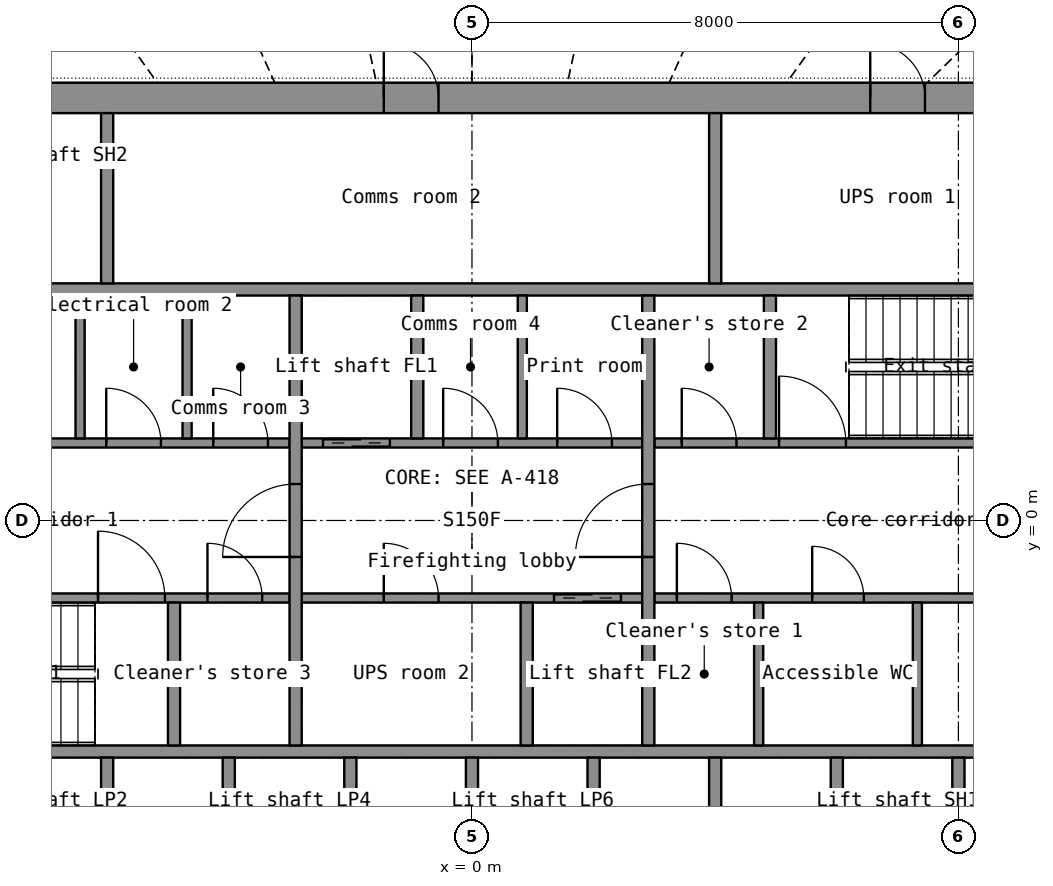
"""IFC4 building model, lengths in metres.
Left out: names, types, materials, properties, quantities, classifications, styles, units other than length and angle.
Written with IfcOpenShell. Run it as: python <this file> out.ifc"""

import sys

from ifc_helpers import new_model, si_unit, direction, frame, frame_2d, origin, place, context, subcontext, project, spatial, rectangle, extrude, element, fill, save


model = new_model("IFC4")
c1 = context("Model", 3, precision=1e-05, world=origin(), true_north=direction((0.0, 1.0)))
c2 = subcontext(c1, "Body", "Model", "MODEL_VIEW")
j1 = project(units=[si_unit("LENGTHUNIT", "METRE"), si_unit("PLANEANGLEUNIT", "RADIAN")], contexts=[c1])
p1 = place(None, origin())
s1 = spatial("IfcSite", under=j1, at=p1, CompositionType="ELEMENT")
p2 = place(p1, origin())
s2 = spatial("IfcBuilding", under=s1, at=p2, CompositionType="ELEMENT")
p3 = place(p2, frame((0.0, 0.0, 134.1)))
s3 = spatial("IfcBuildingStorey", under=s2, at=p3, CompositionType="ELEMENT", Elevation=134.1)
p4 = place(p3, frame((-11.5, 6.95, 0.0), z_axis=(0.0, 0.0, 1.0), x_axis=(1.0, 0.0, 0.0)))
e1 = element("IfcWall", 1, at=p4, inside=s3, PredefinedType="SHEAR", context=c2, shape_type="SweptSolid", body=[
    extrude(rectangle(XDim=23.0, YDim=0.5, at=frame_2d((11.5, 0.0))), origin(), (0.0, 0.0, 1.0), 3.3),
])
p5 = place(p4, frame((1.95, 0.0, 0.0)))
e2 = element("IfcOpeningElement", 2, at=p5, cuts=e1, PredefinedType="OPENING", context=c2, shape_type="SweptSolid", body=[
    extrude(rectangle(XDim=1.1, YDim=2.2, at=frame_2d((0.55, 1.1))), frame((0.0, 0.26, 0.0), z_axis=(0.0, -1.0, 0.0), x_axis=(1.0, 0.0, 0.0)), (0.0, 0.0, 1.0), 0.52),
])
p6 = place(p4, frame((10.05, 0.0, 0.0)))
e3 = element("IfcOpeningElement", 3, at=p6, cuts=e1, PredefinedType="OPENING", context=c2, shape_type="SweptSolid", body=[
    extrude(rectangle(XDim=0.9, YDim=2.1, at=frame_2d((0.45, 1.05))), frame((0.0, 0.26, 0.0), z_axis=(0.0, -1.0, 0.0), x_axis=(1.0, 0.0, 0.0)), (0.0, 0.0, 1.0), 0.52),
])
p7 = place(p4, frame((18.05, 0.0, 0.0)))
e4 = element("IfcOpeningElement", 4, at=p7, cuts=e1, PredefinedType="OPENING", context=c2, shape_type="SweptSolid", body=[
    extrude(rectangle(XDim=0.9, YDim=2.1, at=frame_2d((0.45, 1.05))), frame((0.0, 0.26, 0.0), z_axis=(0.0, -1.0, 0.0), x_axis=(1.0, 0.0, 0.0)), (0.0, 0.0, 1.0), 0.52),
])
p8 = place(p4, frame((0.3, 0.0, 0.0)))
e5 = element("IfcOpeningElement", 5, at=p8, cuts=e1, PredefinedType="OPENING", context=c2, shape_type="SweptSolid", body=[
    extrude(rectangle(XDim=0.8, YDim=2.05, at=frame_2d((0.4, 1.025))), frame((0.0, 0.26, 0.0), z_axis=(0.0, -1.0, 0.0), x_axis=(1.0, 0.0, 0.0)), (0.0, 0.0, 1.0), 0.52),
])
p9 = place(p4, frame((21.9, 0.0, 0.0)))
e6 = element("IfcOpeningElement", 6, at=p9, cuts=e1, PredefinedType="OPENING", context=c2, shape_type="SweptSolid", body=[
    extrude(rectangle(XDim=0.8, YDim=2.05, at=frame_2d((0.4, 1.025))), frame((0.0, 0.26, 0.0), z_axis=(0.0, -1.0, 0.0), x_axis=(1.0, 0.0, 0.0)), (0.0, 0.0, 1.0), 0.52),
])
for number, where, z_axis, x_axis in (
    (7, (-11.5, -3.8, 0.0), (0.0, 0.0, 1.0), (1.0, 0.0, 0.0)),
    (8, (-11.5, 3.8, 0.0), (0.0, 0.0, 1.0), (1.0, 0.0, 0.0)),
):
    element("IfcWall", number, at=place(p3, frame(where, z_axis=z_axis, x_axis=x_axis)), inside=s3, PredefinedType="SHEAR", context=c2, shape_type="SweptSolid", body=[
        extrude(rectangle(XDim=23.0, YDim=0.2, at=frame_2d((11.5, 0.0))), origin(), (0.0, 0.0, 1.0), 3.3),
    ])
for number, where, z_axis, x_axis in (
    (9, (-6.0, -6.7, 0.0), (0.0, 0.0, 1.0), (0.0, 1.0, 0.0)),
    (10, (-4.0, -6.7, 0.0), (0.0, 0.0, 1.0), (0.0, 1.0, 0.0)),
    (11, (-2.0, -6.7, 0.0), (0.0, 0.0, 1.0), (0.0, 1.0, 0.0)),
    (12, (0.0, -6.7, 0.0), (0.0, 0.0, 1.0), (0.0, 1.0, 0.0)),
    (13, (2.0, -6.7, 0.0), (0.0, 0.0, 1.0), (0.0, 1.0, 0.0)),
    (14, (4.0, -6.7, 0.0), (0.0, 0.0, 1.0), (0.0, 1.0, 0.0)),
    (15, (6.0, -6.7, 0.0), (0.0, 0.0, 1.0), (0.0, 1.0, 0.0)),
    (16, (8.0, -6.7, 0.0), (0.0, 0.0, 1.0), (0.0, 1.0, 0.0)),
    (17, (-6.0, 3.9, 0.0), (0.0, 0.0, 1.0), (0.0, 1.0, 0.0)),
):
    element("IfcWall", number, at=place(p3, frame(where, z_axis=z_axis, x_axis=x_axis)), inside=s3, PredefinedType="SHEAR", context=c2, shape_type="SweptSolid", body=[
        extrude(rectangle(XDim=2.8, YDim=0.2, at=frame_2d((1.4, 0.0))), origin(), (0.0, 0.0, 1.0), 3.3),
    ])
p10 = place(p3, frame((4.0, 3.9, 0.0), z_axis=(0.0, 0.0, 1.0), x_axis=(0.0, 1.0, 0.0)))
e18 = element("IfcWall", 18, at=p10, inside=s3, PredefinedType="PARTITIONING", context=c2, shape_type="SweptSolid", body=[
    extrude(rectangle(XDim=2.8, YDim=0.2, at=frame_2d((1.4, 0.0))), origin(), (0.0, 0.0, 1.0), 3.3),
])
p11 = place(p3, frame((-11.5, -1.275, 0.0), z_axis=(0.0, 0.0, 1.0), x_axis=(1.0, 0.0, 0.0)))
e19 = element("IfcWall", 19, at=p11, inside=s3, PredefinedType="SHEAR", context=c2, shape_type="SweptSolid", body=[
    extrude(rectangle(XDim=8.5, YDim=0.15, at=frame_2d((4.25, 0.0))), origin(), (0.0, 0.0, 1.0), 3.3),
])
p12 = place(p11, frame((5.35, 0.0, 0.0)))
e20 = element("IfcOpeningElement", 20, at=p12, cuts=e19, PredefinedType="OPENING", context=c2, shape_type="SweptSolid", body=[
    extrude(rectangle(XDim=1.1, YDim=2.15, at=frame_2d((0.55, 1.075))), frame((0.0, 0.085, 0.0), z_axis=(0.0, -1.0, 0.0), x_axis=(1.0, 0.0, 0.0)), (0.0, 0.0, 1.0), 0.17),
])
p13 = place(p11, frame((7.15, 0.0, 0.0)))
e21 = element("IfcOpeningElement", 21, at=p13, cuts=e19, PredefinedType="OPENING", context=c2, shape_type="SweptSolid", body=[
    extrude(rectangle(XDim=0.9, YDim=2.1, at=frame_2d((0.45, 1.05))), frame((0.0, 0.085, 0.0), z_axis=(0.0, -1.0, 0.0), x_axis=(1.0, 0.0, 0.0)), (0.0, 0.0, 1.0), 0.17),
])
p14 = place(p3, frame((-2.8, -1.275, 0.0), z_axis=(0.0, 0.0, 1.0), x_axis=(1.0, 0.0, 0.0)))
e22 = element("IfcWall", 22, at=p14, inside=s3, PredefinedType="SHEAR", context=c2, shape_type="SweptSolid", body=[
    extrude(rectangle(XDim=5.6, YDim=0.15, at=frame_2d((2.8, 0.0))), origin(), (0.0, 0.0, 1.0), 3.3),
])
p15 = place(p14, frame((4.15, 0.0, 0.0)))
e23 = element("IfcOpeningElement", 23, at=p15, cuts=e22, PredefinedType="OPENING", context=c2, shape_type="SweptSolid", body=[
    extrude(rectangle(XDim=1.1, YDim=2.2, at=frame_2d((0.55, 1.1))), frame((0.0, 0.085, 0.0), z_axis=(0.0, -1.0, 0.0), x_axis=(1.0, 0.0, 0.0)), (0.0, 0.0, 1.0), 0.17),
])
p16 = place(p14, frame((1.35, 0.0, 0.0)))
e24 = element("IfcOpeningElement", 24, at=p16, cuts=e22, PredefinedType="OPENING", context=c2, shape_type="SweptSolid", body=[
    extrude(rectangle(XDim=0.9, YDim=2.1, at=frame_2d((0.45, 1.05))), frame((0.0, 0.085, 0.0), z_axis=(0.0, -1.0, 0.0), x_axis=(1.0, 0.0, 0.0)), (0.0, 0.0, 1.0), 0.17),
])
p17 = place(p3, frame((3.0, -1.275, 0.0), z_axis=(0.0, 0.0, 1.0), x_axis=(1.0, 0.0, 0.0)))
e25 = element("IfcWall", 25, at=p17, inside=s3, PredefinedType="PARTITIONING", context=c2, shape_type="SweptSolid", body=[
    extrude(rectangle(XDim=8.5, YDim=0.15, at=frame_2d((4.25, 0.0))), origin(), (0.0, 0.0, 1.0), 3.3),
])
p18 = place(p17, frame((0.37, 0.0, 0.0)))
e26 = element("IfcOpeningElement", 26, at=p18, cuts=e25, PredefinedType="OPENING", context=c2, shape_type="SweptSolid", body=[
    extrude(rectangle(XDim=0.9, YDim=2.1, at=frame_2d((0.45, 1.05))), frame((0.0, 0.085, 0.0), z_axis=(0.0, -1.0, 0.0), x_axis=(1.0, 0.0, 0.0)), (0.0, 0.0, 1.0), 0.17),
])
p19 = place(p17, frame((2.595, 0.0, 0.0)))
e27 = element("IfcOpeningElement", 27, at=p19, cuts=e25, PredefinedType="OPENING", context=c2, shape_type="SweptSolid", body=[
    extrude(rectangle(XDim=0.85, YDim=2.1, at=frame_2d((0.425, 1.05))), frame((0.0, 0.085, 0.0), z_axis=(0.0, -1.0, 0.0), x_axis=(1.0, 0.0, 0.0)), (0.0, 0.0, 1.0), 0.17),
])
p20 = place(p17, frame((6.025, 0.0, 0.0)))
e28 = element("IfcOpeningElement", 28, at=p20, cuts=e25, PredefinedType="OPENING", context=c2, shape_type="SweptSolid", body=[
    extrude(rectangle(XDim=0.85, YDim=2.1, at=frame_2d((0.425, 1.05))), frame((0.0, 0.085, 0.0), z_axis=(0.0, -1.0, 0.0), x_axis=(1.0, 0.0, 0.0)), (0.0, 0.0, 1.0), 0.17),
])
p21 = place(p3, frame((-11.5, 1.275, 0.0), z_axis=(0.0, 0.0, 1.0), x_axis=(1.0, 0.0, 0.0)))
e29 = element("IfcWall", 29, at=p21, inside=s3, PredefinedType="PARTITIONING", context=c2, shape_type="SweptSolid", body=[
    extrude(rectangle(XDim=8.5, YDim=0.15, at=frame_2d((4.25, 0.0))), origin(), (0.0, 0.0, 1.0), 3.3),
])
p22 = place(p21, frame((0.782, 0.0, 0.0)))
e30 = element("IfcOpeningElement", 30, at=p22, cuts=e29, PredefinedType="OPENING", context=c2, shape_type="SweptSolid", body=[
    extrude(rectangle(XDim=0.85, YDim=2.1, at=frame_2d((0.425, 1.05))), frame((0.0, 0.085, 0.0), z_axis=(0.0, -1.0, 0.0), x_axis=(1.0, 0.0, 0.0)), (0.0, 0.0, 1.0), 0.17),
])
p23 = place(p21, frame((3.347, 0.0, 0.0)))
e31 = element("IfcOpeningElement", 31, at=p23, cuts=e29, PredefinedType="OPENING", context=c2, shape_type="SweptSolid", body=[
    extrude(rectangle(XDim=0.85, YDim=2.1, at=frame_2d((0.425, 1.05))), frame((0.0, 0.085, 0.0), z_axis=(0.0, -1.0, 0.0), x_axis=(1.0, 0.0, 0.0)), (0.0, 0.0, 1.0), 0.17),
])
p24 = place(p21, frame((5.485, 0.0, 0.0)))
e32 = element("IfcOpeningElement", 32, at=p24, cuts=e29, PredefinedType="OPENING", context=c2, shape_type="SweptSolid", body=[
    extrude(rectangle(XDim=0.9, YDim=2.1, at=frame_2d((0.45, 1.05))), frame((0.0, 0.085, 0.0), z_axis=(0.0, -1.0, 0.0), x_axis=(1.0, 0.0, 0.0)), (0.0, 0.0, 1.0), 0.17),
])
p25 = place(p21, frame((7.245, 0.0, 0.0)))
e33 = element("IfcOpeningElement", 33, at=p25, cuts=e29, PredefinedType="OPENING", context=c2, shape_type="SweptSolid", body=[
    extrude(rectangle(XDim=0.9, YDim=2.1, at=frame_2d((0.45, 1.05))), frame((0.0, 0.085, 0.0), z_axis=(0.0, -1.0, 0.0), x_axis=(1.0, 0.0, 0.0)), (0.0, 0.0, 1.0), 0.17),
])
p26 = place(p3, frame((-2.8, 1.275, 0.0), z_axis=(0.0, 0.0, 1.0), x_axis=(1.0, 0.0, 0.0)))
e34 = element("IfcWall", 34, at=p26, inside=s3, PredefinedType="SHEAR", context=c2, shape_type="SweptSolid", body=[
    extrude(rectangle(XDim=5.6, YDim=0.15, at=frame_2d((2.8, 0.0))), origin(), (0.0, 0.0, 1.0), 3.3),
])
p27 = place(p26, frame((0.35, 0.0, 0.0)))
e35 = element("IfcOpeningElement", 35, at=p27, cuts=e34, PredefinedType="OPENING", context=c2, shape_type="SweptSolid", body=[
    extrude(rectangle(XDim=1.1, YDim=2.2, at=frame_2d((0.55, 1.1))), frame((0.0, 0.085, 0.0), z_axis=(0.0, -1.0, 0.0), x_axis=(1.0, 0.0, 0.0)), (0.0, 0.0, 1.0), 0.17),
])
p28 = place(p26, frame((2.326, 0.0, 0.0)))
e36 = element("IfcOpeningElement", 36, at=p28, cuts=e34, PredefinedType="OPENING", context=c2, shape_type="SweptSolid", body=[
    extrude(rectangle(XDim=0.9, YDim=2.1, at=frame_2d((0.45, 1.05))), frame((0.0, 0.085, 0.0), z_axis=(0.0, -1.0, 0.0), x_axis=(1.0, 0.0, 0.0)), (0.0, 0.0, 1.0), 0.17),
])
p29 = place(p26, frame((4.201, 0.0, 0.0)))
e37 = element("IfcOpeningElement", 37, at=p29, cuts=e34, PredefinedType="OPENING", context=c2, shape_type="SweptSolid", body=[
    extrude(rectangle(XDim=0.9, YDim=2.1, at=frame_2d((0.45, 1.05))), frame((0.0, 0.085, 0.0), z_axis=(0.0, -1.0, 0.0), x_axis=(1.0, 0.0, 0.0)), (0.0, 0.0, 1.0), 0.17),
])
p30 = place(p3, frame((3.0, 1.275, 0.0), z_axis=(0.0, 0.0, 1.0), x_axis=(1.0, 0.0, 0.0)))
e38 = element("IfcWall", 38, at=p30, inside=s3, PredefinedType="SHEAR", context=c2, shape_type="SweptSolid", body=[
    extrude(rectangle(XDim=8.5, YDim=0.15, at=frame_2d((4.25, 0.0))), origin(), (0.0, 0.0, 1.0), 3.3),
])
p31 = place(p30, frame((2.05, 0.0, 0.0)))
e39 = element("IfcOpeningElement", 39, at=p31, cuts=e38, PredefinedType="OPENING", context=c2, shape_type="SweptSolid", body=[
    extrude(rectangle(XDim=1.1, YDim=2.15, at=frame_2d((0.55, 1.075))), frame((0.0, 0.085, 0.0), z_axis=(0.0, -1.0, 0.0), x_axis=(1.0, 0.0, 0.0)), (0.0, 0.0, 1.0), 0.17),
])
p32 = place(p30, frame((0.45, 0.0, 0.0)))
e40 = element("IfcOpeningElement", 40, at=p32, cuts=e38, PredefinedType="OPENING", context=c2, shape_type="SweptSolid", body=[
    extrude(rectangle(XDim=0.9, YDim=2.1, at=frame_2d((0.45, 1.05))), frame((0.0, 0.085, 0.0), z_axis=(0.0, -1.0, 0.0), x_axis=(1.0, 0.0, 0.0)), (0.0, 0.0, 1.0), 0.17),
])
p33 = place(p3, frame((-2.9, -3.7, 0.0), z_axis=(0.0, 0.0, 1.0), x_axis=(0.0, 1.0, 0.0)))
e41 = element("IfcWall", 41, at=p33, inside=s3, PredefinedType="SHEAR", context=c2, shape_type="SweptSolid", body=[
    extrude(rectangle(XDim=7.4, YDim=0.2, at=frame_2d((3.7, 0.0))), origin(), (0.0, 0.0, 1.0), 3.3),
])
p34 = place(p33, frame((3.1, 0.0, 0.0)))
e42 = element("IfcOpeningElement", 42, at=p34, cuts=e41, PredefinedType="OPENING", context=c2, shape_type="SweptSolid", body=[
    extrude(rectangle(XDim=1.2, YDim=2.2, at=frame_2d((0.6, 1.1))), frame((0.0, 0.11, 0.0), z_axis=(0.0, -1.0, 0.0), x_axis=(1.0, 0.0, 0.0)), (0.0, 0.0, 1.0), 0.22),
])
p35 = place(p3, frame((2.9, -3.7, 0.0), z_axis=(0.0, 0.0, 1.0), x_axis=(0.0, 1.0, 0.0)))
e43 = element("IfcWall", 43, at=p35, inside=s3, PredefinedType="SHEAR", context=c2, shape_type="SweptSolid", body=[
    extrude(rectangle(XDim=7.4, YDim=0.2, at=frame_2d((3.7, 0.0))), origin(), (0.0, 0.0, 1.0), 3.3),
])
p36 = place(p35, frame((3.1, 0.0, 0.0)))
e44 = element("IfcOpeningElement", 44, at=p36, cuts=e43, PredefinedType="OPENING", context=c2, shape_type="SweptSolid", body=[
    extrude(rectangle(XDim=1.2, YDim=2.2, at=frame_2d((0.6, 1.1))), frame((0.0, 0.11, 0.0), z_axis=(0.0, -1.0, 0.0), x_axis=(1.0, 0.0, 0.0)), (0.0, 0.0, 1.0), 0.22),
])
for number, where, z_axis, x_axis in (
    (45, (-0.9, 1.35, 0.0), (0.0, 0.0, 1.0), (0.0, 1.0, 0.0)),
    (46, (0.9, -3.7, 0.0), (0.0, 0.0, 1.0), (0.0, 1.0, 0.0)),
    (47, (-4.9, -3.7, 0.0), (0.0, 0.0, 1.0), (0.0, 1.0, 0.0)),
    (48, (4.9, 1.35, 0.0), (0.0, 0.0, 1.0), (0.0, 1.0, 0.0)),
):
    element("IfcWall", number, at=place(p3, frame(where, z_axis=z_axis, x_axis=x_axis)), inside=s3, PredefinedType="SHEAR", context=c2, shape_type="SweptSolid", body=[
        extrude(rectangle(XDim=2.35, YDim=0.2, at=frame_2d((1.175, 0.0))), origin(), (0.0, 0.0, 1.0), 3.3),
    ])
for number, where, z_axis, x_axis in (
    (49, (-6.445, 1.35, 0.0), (0.0, 0.0, 1.0), (0.0, 1.0, 0.0)),
    (50, (-4.685, 1.35, 0.0), (0.0, 0.0, 1.0), (0.0, 1.0, 0.0)),
    (51, (4.715, -3.7, 0.0), (0.0, 0.0, 1.0), (0.0, 1.0, 0.0)),
    (52, (7.325, -3.7, 0.0), (0.0, 0.0, 1.0), (0.0, 1.0, 0.0)),
    (53, (0.827, 1.35, 0.0), (0.0, 0.0, 1.0), (0.0, 1.0, 0.0)),
):
    element("IfcWall", number, at=place(p3, frame(where, z_axis=z_axis, x_axis=x_axis)), inside=s3, PredefinedType="PARTITIONING", context=c2, shape_type="SweptSolid", body=[
        extrude(rectangle(XDim=2.35, YDim=0.15, at=frame_2d((1.175, 0.0))), origin(), (0.0, 0.0, 1.0), 3.3),
    ])
p37 = place(p6, origin())
e54 = element("IfcDoor", 54, at=p37, inside=s3, OperationType="SINGLE_SWING_LEFT", PredefinedType="DOOR", context=c2, shape_type="SweptSolid", body=[
    extrude(rectangle(XDim=0.9, YDim=2.1, at=frame_2d((0.45, 1.05))), frame((0.0, 0.025, 0.0), z_axis=(0.0, -1.0, 0.0), x_axis=(1.0, 0.0, 0.0)), (0.0, 0.0, 1.0), 0.05),
])
fill(e3, e54)
p38 = place(p7, origin())
e55 = element("IfcDoor", 55, at=p38, inside=s3, OperationType="SINGLE_SWING_LEFT", PredefinedType="DOOR", context=c2, shape_type="SweptSolid", body=[
    extrude(rectangle(XDim=0.9, YDim=2.1, at=frame_2d((0.45, 1.05))), frame((0.0, 0.025, 0.0), z_axis=(0.0, -1.0, 0.0), x_axis=(1.0, 0.0, 0.0)), (0.0, 0.0, 1.0), 0.05),
])
fill(e4, e55)
p39 = place(p34, origin())
e56 = element("IfcDoor", 56, at=p39, inside=s3, OperationType="SINGLE_SWING_LEFT", PredefinedType="DOOR", context=c2, shape_type="SweptSolid", body=[
    extrude(rectangle(XDim=1.2, YDim=2.2, at=frame_2d((0.6, 1.1))), frame((0.0, 0.025, 0.0), z_axis=(0.0, -1.0, 0.0), x_axis=(1.0, 0.0, 0.0)), (0.0, 0.0, 1.0), 0.05),
])
fill(e42, e56)
p40 = place(p36, origin())
e57 = element("IfcDoor", 57, at=p40, inside=s3, OperationType="SINGLE_SWING_LEFT", PredefinedType="DOOR", context=c2, shape_type="SweptSolid", body=[
    extrude(rectangle(XDim=1.2, YDim=2.2, at=frame_2d((0.6, 1.1))), frame((0.0, 0.025, 0.0), z_axis=(0.0, -1.0, 0.0), x_axis=(1.0, 0.0, 0.0)), (0.0, 0.0, 1.0), 0.05),
])
fill(e44, e57)
p41 = place(p27, origin())
e58 = element("IfcDoor", 58, at=p41, inside=s3, OperationType="DOUBLE_DOOR_SLIDING", PredefinedType="DOOR", context=c2, shape_type="SweptSolid", body=[
    extrude(rectangle(XDim=1.1, YDim=2.2, at=frame_2d((0.55, 1.1))), frame((0.0, 0.025, 0.0), z_axis=(0.0, -1.0, 0.0), x_axis=(1.0, 0.0, 0.0)), (0.0, 0.0, 1.0), 0.05),
])
fill(e35, e58)
p42 = place(p15, origin())
e59 = element("IfcDoor", 59, at=p42, inside=s3, OperationType="DOUBLE_DOOR_SLIDING", PredefinedType="DOOR", context=c2, shape_type="SweptSolid", body=[
    extrude(rectangle(XDim=1.1, YDim=2.2, at=frame_2d((0.55, 1.1))), frame((0.0, 0.025, 0.0), z_axis=(0.0, -1.0, 0.0), x_axis=(1.0, 0.0, 0.0)), (0.0, 0.0, 1.0), 0.05),
])
fill(e23, e59)
p43 = place(p12, origin())
e60 = element("IfcDoor", 60, at=p43, inside=s3, OperationType="SINGLE_SWING_LEFT", PredefinedType="DOOR", context=c2, shape_type="SweptSolid", body=[
    extrude(rectangle(XDim=1.1, YDim=2.15, at=frame_2d((0.55, 1.075))), frame((0.0, 0.025, 0.0), z_axis=(0.0, -1.0, 0.0), x_axis=(1.0, 0.0, 0.0)), (0.0, 0.0, 1.0), 0.05),
])
fill(e20, e60)
p44 = place(p31, origin())
e61 = element("IfcDoor", 61, at=p44, inside=s3, OperationType="SINGLE_SWING_LEFT", PredefinedType="DOOR", context=c2, shape_type="SweptSolid", body=[
    extrude(rectangle(XDim=1.1, YDim=2.15, at=frame_2d((0.55, 1.075))), frame((0.0, 0.025, 0.0), z_axis=(0.0, -1.0, 0.0), x_axis=(1.0, 0.0, 0.0)), (0.0, 0.0, 1.0), 0.05),
])
fill(e39, e61)
p45 = place(p24, origin())
e62 = element("IfcDoor", 62, at=p45, inside=s3, OperationType="SINGLE_SWING_LEFT", PredefinedType="DOOR", context=c2, shape_type="SweptSolid", body=[
    extrude(rectangle(XDim=0.9, YDim=2.1, at=frame_2d((0.45, 1.05))), frame((0.0, 0.025, 0.0), z_axis=(0.0, -1.0, 0.0), x_axis=(1.0, 0.0, 0.0)), (0.0, 0.0, 1.0), 0.05),
])
fill(e32, e62)
p46 = place(p25, origin())
e63 = element("IfcDoor", 63, at=p46, inside=s3, OperationType="SINGLE_SWING_LEFT", PredefinedType="DOOR", context=c2, shape_type="SweptSolid", body=[
    extrude(rectangle(XDim=0.9, YDim=2.1, at=frame_2d((0.45, 1.05))), frame((0.0, 0.025, 0.0), z_axis=(0.0, -1.0, 0.0), x_axis=(1.0, 0.0, 0.0)), (0.0, 0.0, 1.0), 0.05),
])
fill(e33, e63)
p47 = place(p18, origin())
e64 = element("IfcDoor", 64, at=p47, inside=s3, OperationType="SINGLE_SWING_LEFT", PredefinedType="DOOR", context=c2, shape_type="SweptSolid", body=[
    extrude(rectangle(XDim=0.9, YDim=2.1, at=frame_2d((0.45, 1.05))), frame((0.0, 0.025, 0.0), z_axis=(0.0, -1.0, 0.0), x_axis=(1.0, 0.0, 0.0)), (0.0, 0.0, 1.0), 0.05),
])
fill(e26, e64)
p48 = place(p19, origin())
e65 = element("IfcDoor", 65, at=p48, inside=s3, OperationType="SINGLE_SWING_LEFT", PredefinedType="DOOR", context=c2, shape_type="SweptSolid", body=[
    extrude(rectangle(XDim=0.85, YDim=2.1, at=frame_2d((0.425, 1.05))), frame((0.0, 0.025, 0.0), z_axis=(0.0, -1.0, 0.0), x_axis=(1.0, 0.0, 0.0)), (0.0, 0.0, 1.0), 0.05),
])
fill(e27, e65)
p49 = place(p28, origin())
e66 = element("IfcDoor", 66, at=p49, inside=s3, OperationType="SINGLE_SWING_LEFT", PredefinedType="DOOR", context=c2, shape_type="SweptSolid", body=[
    extrude(rectangle(XDim=0.9, YDim=2.1, at=frame_2d((0.45, 1.05))), frame((0.0, 0.025, 0.0), z_axis=(0.0, -1.0, 0.0), x_axis=(1.0, 0.0, 0.0)), (0.0, 0.0, 1.0), 0.05),
])
fill(e36, e66)
p50 = place(p29, origin())
e67 = element("IfcDoor", 67, at=p50, inside=s3, OperationType="SINGLE_SWING_LEFT", PredefinedType="DOOR", context=c2, shape_type="SweptSolid", body=[
    extrude(rectangle(XDim=0.9, YDim=2.1, at=frame_2d((0.45, 1.05))), frame((0.0, 0.025, 0.0), z_axis=(0.0, -1.0, 0.0), x_axis=(1.0, 0.0, 0.0)), (0.0, 0.0, 1.0), 0.05),
])
fill(e37, e67)
p51 = place(p16, origin())
e68 = element("IfcDoor", 68, at=p51, inside=s3, OperationType="SINGLE_SWING_LEFT", PredefinedType="DOOR", context=c2, shape_type="SweptSolid", body=[
    extrude(rectangle(XDim=0.9, YDim=2.1, at=frame_2d((0.45, 1.05))), frame((0.0, 0.025, 0.0), z_axis=(0.0, -1.0, 0.0), x_axis=(1.0, 0.0, 0.0)), (0.0, 0.0, 1.0), 0.05),
])
fill(e24, e68)
p52 = place(p32, origin())
e69 = element("IfcDoor", 69, at=p52, inside=s3, OperationType="SINGLE_SWING_LEFT", PredefinedType="DOOR", context=c2, shape_type="SweptSolid", body=[
    extrude(rectangle(XDim=0.9, YDim=2.1, at=frame_2d((0.45, 1.05))), frame((0.0, 0.025, 0.0), z_axis=(0.0, -1.0, 0.0), x_axis=(1.0, 0.0, 0.0)), (0.0, 0.0, 1.0), 0.05),
])
fill(e40, e69)
p53 = place(p13, origin())
e70 = element("IfcDoor", 70, at=p53, inside=s3, OperationType="SINGLE_SWING_LEFT", PredefinedType="DOOR", context=c2, shape_type="SweptSolid", body=[
    extrude(rectangle(XDim=0.9, YDim=2.1, at=frame_2d((0.45, 1.05))), frame((0.0, 0.025, 0.0), z_axis=(0.0, -1.0, 0.0), x_axis=(1.0, 0.0, 0.0)), (0.0, 0.0, 1.0), 0.05),
])
fill(e21, e70)
save(model, sys.argv[1])
